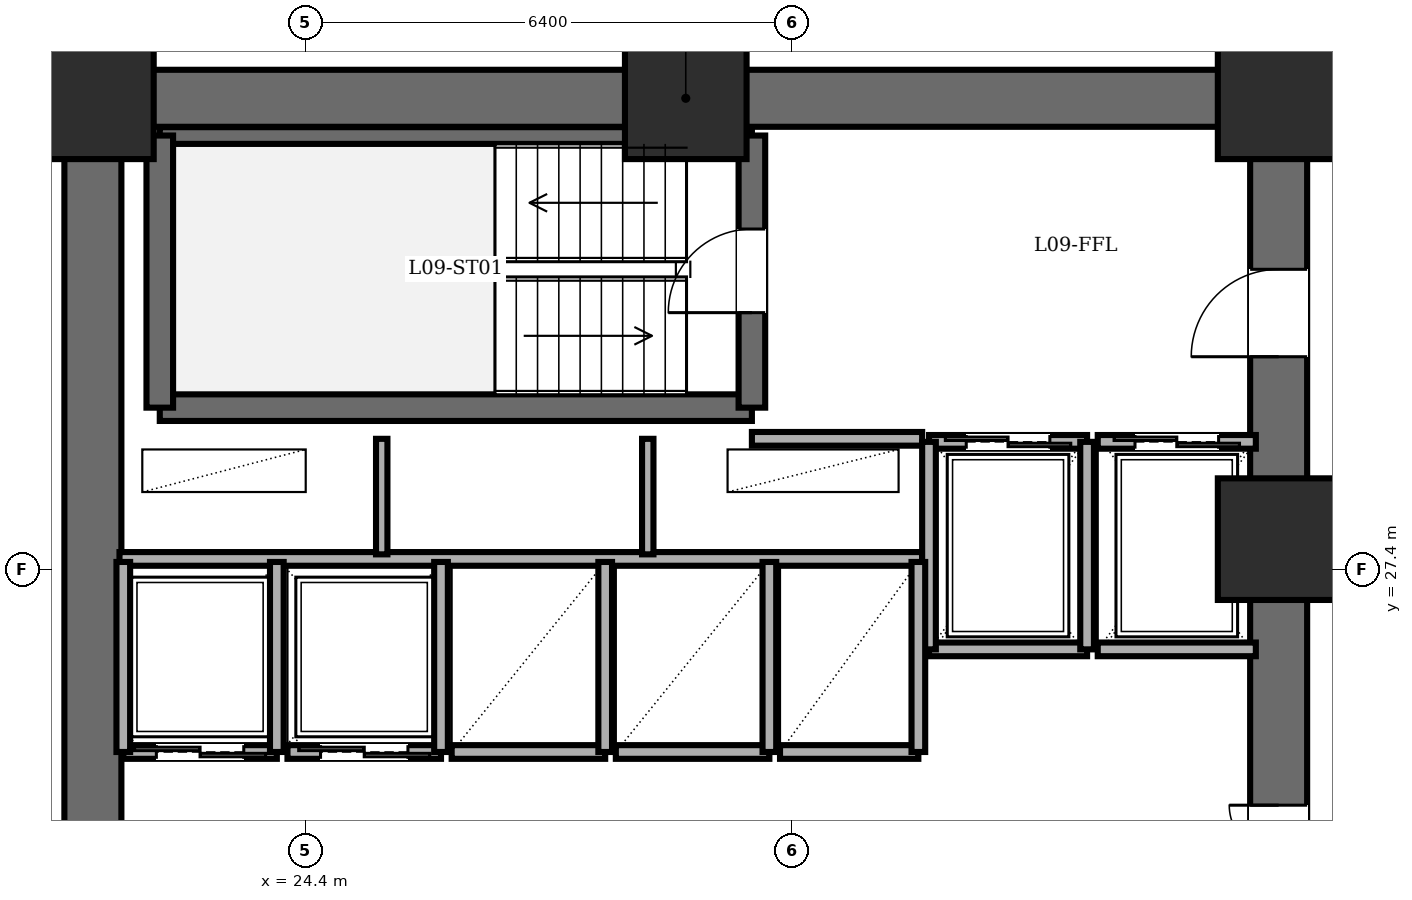
"""IFC4 building model, lengths in metres.
Left out: names, types, materials, properties, quantities, classifications, styles, units other than length and angle.
Written with IfcOpenShell. Run it as: python <this file> out.ifc"""

import sys

from ifc_helpers import new_model, si_unit, direction, frame, frame_2d, origin, origin_2d, place, context, subcontext, project, spatial, rectangle, extrude, element, fill, save


model = new_model("IFC4")
c1 = context("Model", 3, precision=1e-05, world=origin(), true_north=direction((0.0, 1.0)))
c2 = subcontext(c1, "Body", "Model", "MODEL_VIEW")
j1 = project(units=[si_unit("LENGTHUNIT", "METRE"), si_unit("PLANEANGLEUNIT", "RADIAN")], contexts=[c1])
p1 = place(None, origin())
s1 = spatial("IfcSite", under=j1, at=p1, CompositionType="ELEMENT")
p2 = place(p1, origin())
s2 = spatial("IfcBuilding", under=s1, at=p2, CompositionType="ELEMENT")
p3 = place(p2, frame((0.0, 0.0, 36.0)))
s3 = spatial("IfcBuildingStorey", under=s2, at=p3, CompositionType="ELEMENT", Elevation=36.0)
for number, where, z_axis, x_axis in (
    (1, (37.2, 27.8, 0.0), (0.0, 0.0, 1.0), (1.0, 0.0, 0.0)),
    (2, (37.2, 33.6, 0.0), (0.0, 0.0, 1.0), (1.0, 0.0, 0.0)),
    (3, (29.4, 33.6, 0.0), (0.0, 0.0, 1.0), (1.0, 0.0, 0.0)),
    (4, (21.6, 33.6, 0.0), (0.0, 0.0, 1.0), (1.0, 0.0, 0.0)),
):
    element("IfcColumn", number, at=place(p3, frame(where, z_axis=z_axis, x_axis=x_axis)), inside=s3, PredefinedType="COLUMN", context=c2, shape_type="SweptSolid", body=[
        extrude(rectangle(XDim=1.6, YDim=1.6, at=origin_2d()), origin(), (0.0, 0.0, 1.0), 3.6),
    ])
p4 = place(p3, frame((21.6, 14.4, 0.0), z_axis=(0.0, 0.0, 1.0), x_axis=(0.0, 1.0, 0.0)))
e5 = element("IfcWall", 5, at=p4, inside=s3, PredefinedType="SHEAR", context=c2, shape_type="SweptSolid", body=[
    extrude(rectangle(XDim=19.2, YDim=0.75, at=frame_2d((9.6, 0.0))), origin(), (0.0, 0.0, 1.0), 3.4),
])
p5 = place(p3, frame((21.6, 33.6, 0.0), z_axis=(0.0, 0.0, 1.0), x_axis=(1.0, 0.0, 0.0)))
e6 = element("IfcWall", 6, at=p5, inside=s3, PredefinedType="SHEAR", context=c2, shape_type="SweptSolid", body=[
    extrude(rectangle(XDim=15.6, YDim=0.75, at=frame_2d((7.8, 0.0))), origin(), (0.0, 0.0, 1.0), 3.4),
])
p6 = place(p3, frame((37.2, 14.4, 0.0), z_axis=(0.0, 0.0, 1.0), x_axis=(0.0, 1.0, 0.0)))
e7 = element("IfcWall", 7, at=p6, inside=s3, PredefinedType="SHEAR", context=c2, shape_type="SweptSolid", body=[
    extrude(rectangle(XDim=19.2, YDim=0.75, at=frame_2d((9.6, 0.0))), origin(), (0.0, 0.0, 1.0), 3.4),
])
p7 = place(p6, frame((15.8, 0.0, 0.0)))
e8 = element("IfcOpeningElement", 8, at=p7, cuts=e7, PredefinedType="OPENING", context=c2, shape_type="SweptSolid", body=[
    extrude(rectangle(XDim=1.15, YDim=2.15, at=frame_2d((0.575, 1.075))), frame((0.0, 0.385, 0.0), z_axis=(0.0, -1.0, 0.0), x_axis=(1.0, 0.0, 0.0)), (0.0, 0.0, 1.0), 0.77),
])
p8 = place(p6, frame((3.6, 0.0, 0.0)))
e9 = element("IfcOpeningElement", 9, at=p8, cuts=e7, PredefinedType="OPENING", context=c2, shape_type="SweptSolid", body=[
    extrude(rectangle(XDim=1.1, YDim=2.15, at=frame_2d((0.55, 1.075))), frame((0.0, 0.385, 0.0), z_axis=(0.0, -1.0, 0.0), x_axis=(1.0, 0.0, 0.0)), (0.0, 0.0, 1.0), 0.77),
])
p9 = place(p6, frame((8.6, 0.0, 0.0)))
e10 = element("IfcOpeningElement", 10, at=p9, cuts=e7, PredefinedType="OPENING", context=c2, shape_type="SweptSolid", body=[
    extrude(rectangle(XDim=1.3, YDim=2.2, at=frame_2d((0.65, 1.1))), frame((0.0, 0.385, 0.0), z_axis=(0.0, -1.0, 0.0), x_axis=(1.0, 0.0, 0.0)), (0.0, 0.0, 1.0), 0.77),
])
p10 = place(p3, frame((22.48, 29.53, 0.0), z_axis=(0.0, 0.0, 1.0), x_axis=(1.0, 0.0, 0.0)))
e11 = element("IfcWall", 11, at=p10, inside=s3, PredefinedType="SOLIDWALL", context=c2, shape_type="SweptSolid", body=[
    extrude(rectangle(XDim=7.79, YDim=0.35, at=frame_2d((3.895, 0.0))), origin(), (0.0, 0.0, 1.0), 3.4),
])
p11 = place(p3, frame((22.48, 33.11, 0.0), z_axis=(0.0, 0.0, 1.0), x_axis=(1.0, 0.0, 0.0)))
e12 = element("IfcWall", 12, at=p11, inside=s3, PredefinedType="PARTITIONING", context=c2, shape_type="SweptSolid", body=[
    extrude(rectangle(XDim=7.79, YDim=0.22, at=frame_2d((3.895, 0.0))), origin(), (0.0, 0.0, 1.0), 3.4),
])
p12 = place(p3, frame((22.48, 29.53, 0.0), z_axis=(0.0, 0.0, 1.0), x_axis=(0.0, 1.0, 0.0)))
e13 = element("IfcWall", 13, at=p12, inside=s3, PredefinedType="SOLIDWALL", context=c2, shape_type="SweptSolid", body=[
    extrude(rectangle(XDim=3.58, YDim=0.35, at=frame_2d((1.79, 0.0))), origin(), (0.0, 0.0, 1.0), 3.4),
])
p13 = place(p3, frame((30.27, 29.53, 0.0), z_axis=(0.0, 0.0, 1.0), x_axis=(0.0, 1.0, 0.0)))
e14 = element("IfcWall", 14, at=p13, inside=s3, PredefinedType="SOLIDWALL", context=c2, shape_type="SweptSolid", body=[
    extrude(rectangle(XDim=3.58, YDim=0.35, at=frame_2d((1.79, 0.0))), origin(), (0.0, 0.0, 1.0), 3.4),
])
p14 = place(p13, frame((1.25, 0.0, 0.0)))
e15 = element("IfcOpeningElement", 15, at=p14, cuts=e14, PredefinedType="OPENING", context=c2, shape_type="SweptSolid", body=[
    extrude(rectangle(XDim=1.1, YDim=2.15, at=frame_2d((0.55, 1.075))), frame((0.0, 0.185, 0.0), z_axis=(0.0, -1.0, 0.0), x_axis=(1.0, 0.0, 0.0)), (0.0, 0.0, 1.0), 0.37),
])
p15 = place(p3, frame((30.27, 29.12, 0.0), z_axis=(0.0, 0.0, 1.0), x_axis=(1.0, 0.0, 0.0)))
e16 = element("IfcWall", 16, at=p15, inside=s3, PredefinedType="PARTITIONING", context=c2, shape_type="SweptSolid", body=[
    extrude(rectangle(XDim=2.24, YDim=0.18, at=frame_2d((1.12, 0.0))), origin(), (0.0, 0.0, 1.0), 3.4),
])
p16 = place(p3, frame((21.95, 27.54, 0.0), z_axis=(0.0, 0.0, 1.0), x_axis=(1.0, 0.0, 0.0)))
e17 = element("IfcWall", 17, at=p16, inside=s3, PredefinedType="PARTITIONING", context=c2, shape_type="SweptSolid", body=[
    extrude(rectangle(XDim=10.56, YDim=0.18, at=frame_2d((5.28, 0.0))), origin(), (0.0, 0.0, 1.0), 3.4),
])
for number, where, z_axis, x_axis in (
    (18, (25.4, 27.6, 0.0), (0.0, 0.0, 1.0), (0.0, 1.0, 0.0)),
    (19, (28.9, 27.6, 0.0), (0.0, 0.0, 1.0), (0.0, 1.0, 0.0)),
):
    element("IfcWall", number, at=place(p3, frame(where, z_axis=z_axis, x_axis=x_axis)), inside=s3, PredefinedType="PARTITIONING", context=c2, shape_type="SweptSolid", body=[
        extrude(rectangle(XDim=1.52, YDim=0.15, at=frame_2d((0.76, 0.0))), origin(), (0.0, 0.0, 1.0), 3.4),
    ])
p17 = place(p3, frame((32.6, 29.08, 0.0), z_axis=(0.0, 0.0, 1.0), x_axis=(1.0, 0.0, 0.0)))
e20 = element("IfcWall", 20, at=p17, inside=s3, PredefinedType="PARTITIONING", context=c2, shape_type="SweptSolid", body=[
    extrude(rectangle(XDim=2.08, YDim=0.18, at=frame_2d((1.04, 0.0))), origin(), (0.0, 0.0, 1.0), 3.4),
])
p18 = place(p17, frame((0.49, 0.0, 0.0)))
e21 = element("IfcOpeningElement", 21, at=p18, cuts=e20, PredefinedType="OPENING", context=c2, shape_type="SweptSolid", body=[
    extrude(rectangle(XDim=1.1, YDim=2.2, at=frame_2d((0.55, 1.1))), frame((0.0, 0.1, 0.0), z_axis=(0.0, -1.0, 0.0), x_axis=(1.0, 0.0, 0.0)), (0.0, 0.0, 1.0), 0.2),
])
p19 = place(p3, frame((34.68, 26.35, 0.0), z_axis=(0.0, 0.0, 1.0), x_axis=(-1.0, 0.0, 0.0)))
e22 = element("IfcWall", 22, at=p19, inside=s3, PredefinedType="PARTITIONING", context=c2, shape_type="SweptSolid", body=[
    extrude(rectangle(XDim=2.08, YDim=0.18, at=frame_2d((1.04, 0.0))), origin(), (0.0, 0.0, 1.0), 3.4),
])
for number, where, z_axis, x_axis in (
    (23, (34.68, 26.35, 0.0), (0.0, 0.0, 1.0), (0.0, 1.0, 0.0)),
    (24, (32.6, 29.08, 0.0), (0.0, 0.0, 1.0), (0.0, -1.0, 0.0)),
):
    element("IfcWall", number, at=place(p3, frame(where, z_axis=z_axis, x_axis=x_axis)), inside=s3, PredefinedType="PARTITIONING", context=c2, shape_type="SweptSolid", body=[
        extrude(rectangle(XDim=2.73, YDim=0.18, at=frame_2d((1.365, 0.0))), origin(), (0.0, 0.0, 1.0), 3.4),
    ])
p20 = place(p3, frame((34.82, 29.08, 0.0), z_axis=(0.0, 0.0, 1.0), x_axis=(1.0, 0.0, 0.0)))
e25 = element("IfcWall", 25, at=p20, inside=s3, PredefinedType="PARTITIONING", context=c2, shape_type="SweptSolid", body=[
    extrude(rectangle(XDim=2.08, YDim=0.18, at=frame_2d((1.04, 0.0))), origin(), (0.0, 0.0, 1.0), 3.4),
])
p21 = place(p20, frame((0.49, 0.0, 0.0)))
e26 = element("IfcOpeningElement", 26, at=p21, cuts=e25, PredefinedType="OPENING", context=c2, shape_type="SweptSolid", body=[
    extrude(rectangle(XDim=1.1, YDim=2.2, at=frame_2d((0.55, 1.1))), frame((0.0, 0.1, 0.0), z_axis=(0.0, -1.0, 0.0), x_axis=(1.0, 0.0, 0.0)), (0.0, 0.0, 1.0), 0.2),
])
p22 = place(p3, frame((36.9, 26.35, 0.0), z_axis=(0.0, 0.0, 1.0), x_axis=(-1.0, 0.0, 0.0)))
e27 = element("IfcWall", 27, at=p22, inside=s3, PredefinedType="PARTITIONING", context=c2, shape_type="SweptSolid", body=[
    extrude(rectangle(XDim=2.08, YDim=0.18, at=frame_2d((1.04, 0.0))), origin(), (0.0, 0.0, 1.0), 3.4),
])
p23 = place(p3, frame((24.02, 25.0, 0.0), z_axis=(0.0, 0.0, 1.0), x_axis=(-1.0, 0.0, 0.0)))
e28 = element("IfcWall", 28, at=p23, inside=s3, PredefinedType="PARTITIONING", context=c2, shape_type="SweptSolid", body=[
    extrude(rectangle(XDim=2.02, YDim=0.18, at=frame_2d((1.01, 0.0))), origin(), (0.0, 0.0, 1.0), 3.4),
])
p24 = place(p23, frame((0.435, 0.0, 0.0)))
e29 = element("IfcOpeningElement", 29, at=p24, cuts=e28, PredefinedType="OPENING", context=c2, shape_type="SweptSolid", body=[
    extrude(rectangle(XDim=1.15, YDim=2.2, at=frame_2d((0.575, 1.1))), frame((0.0, 0.1, 0.0), z_axis=(0.0, -1.0, 0.0), x_axis=(1.0, 0.0, 0.0)), (0.0, 0.0, 1.0), 0.2),
])
for number, where, z_axis, x_axis in (
    (30, (24.02, 25.0, 0.0), (0.0, 0.0, 1.0), (0.0, 1.0, 0.0)),
    (31, (22.0, 27.5, 0.0), (0.0, 0.0, 1.0), (0.0, -1.0, 0.0)),
):
    element("IfcWall", number, at=place(p3, frame(where, z_axis=z_axis, x_axis=x_axis)), inside=s3, PredefinedType="PARTITIONING", context=c2, shape_type="SweptSolid", body=[
        extrude(rectangle(XDim=2.5, YDim=0.18, at=frame_2d((1.25, 0.0))), origin(), (0.0, 0.0, 1.0), 3.4),
    ])
p25 = place(p3, frame((26.18, 25.0, 0.0), z_axis=(0.0, 0.0, 1.0), x_axis=(-1.0, 0.0, 0.0)))
e32 = element("IfcWall", 32, at=p25, inside=s3, PredefinedType="PARTITIONING", context=c2, shape_type="SweptSolid", body=[
    extrude(rectangle(XDim=2.02, YDim=0.18, at=frame_2d((1.01, 0.0))), origin(), (0.0, 0.0, 1.0), 3.4),
])
p26 = place(p25, frame((0.435, 0.0, 0.0)))
e33 = element("IfcOpeningElement", 33, at=p26, cuts=e32, PredefinedType="OPENING", context=c2, shape_type="SweptSolid", body=[
    extrude(rectangle(XDim=1.15, YDim=2.2, at=frame_2d((0.575, 1.1))), frame((0.0, 0.1, 0.0), z_axis=(0.0, -1.0, 0.0), x_axis=(1.0, 0.0, 0.0)), (0.0, 0.0, 1.0), 0.2),
])
p27 = place(p3, frame((26.18, 25.0, 0.0), z_axis=(0.0, 0.0, 1.0), x_axis=(0.0, 1.0, 0.0)))
e34 = element("IfcWall", 34, at=p27, inside=s3, PredefinedType="PARTITIONING", context=c2, shape_type="SweptSolid", body=[
    extrude(rectangle(XDim=2.5, YDim=0.18, at=frame_2d((1.25, 0.0))), origin(), (0.0, 0.0, 1.0), 3.4),
])
p28 = place(p3, frame((28.34, 25.0, 0.0), z_axis=(0.0, 0.0, 1.0), x_axis=(-1.0, 0.0, 0.0)))
e35 = element("IfcWall", 35, at=p28, inside=s3, PredefinedType="PARTITIONING", context=c2, shape_type="SweptSolid", body=[
    extrude(rectangle(XDim=2.02, YDim=0.18, at=frame_2d((1.01, 0.0))), origin(), (0.0, 0.0, 1.0), 3.4),
])
p29 = place(p3, frame((28.34, 25.0, 0.0), z_axis=(0.0, 0.0, 1.0), x_axis=(0.0, 1.0, 0.0)))
e36 = element("IfcWall", 36, at=p29, inside=s3, PredefinedType="PARTITIONING", context=c2, shape_type="SweptSolid", body=[
    extrude(rectangle(XDim=2.5, YDim=0.18, at=frame_2d((1.25, 0.0))), origin(), (0.0, 0.0, 1.0), 3.4),
])
p30 = place(p3, frame((30.5, 25.0, 0.0), z_axis=(0.0, 0.0, 1.0), x_axis=(-1.0, 0.0, 0.0)))
e37 = element("IfcWall", 37, at=p30, inside=s3, PredefinedType="PARTITIONING", context=c2, shape_type="SweptSolid", body=[
    extrude(rectangle(XDim=2.02, YDim=0.18, at=frame_2d((1.01, 0.0))), origin(), (0.0, 0.0, 1.0), 3.4),
])
p31 = place(p3, frame((30.5, 25.0, 0.0), z_axis=(0.0, 0.0, 1.0), x_axis=(0.0, 1.0, 0.0)))
e38 = element("IfcWall", 38, at=p31, inside=s3, PredefinedType="PARTITIONING", context=c2, shape_type="SweptSolid", body=[
    extrude(rectangle(XDim=2.5, YDim=0.18, at=frame_2d((1.25, 0.0))), origin(), (0.0, 0.0, 1.0), 3.4),
])
p32 = place(p3, frame((32.46, 25.0, 0.0), z_axis=(0.0, 0.0, 1.0), x_axis=(-1.0, 0.0, 0.0)))
e39 = element("IfcWall", 39, at=p32, inside=s3, PredefinedType="PARTITIONING", context=c2, shape_type="SweptSolid", body=[
    extrude(rectangle(XDim=1.82, YDim=0.18, at=frame_2d((0.91, 0.0))), origin(), (0.0, 0.0, 1.0), 3.4),
])
p33 = place(p3, frame((32.46, 25.0, 0.0), z_axis=(0.0, 0.0, 1.0), x_axis=(0.0, 1.0, 0.0)))
e40 = element("IfcWall", 40, at=p33, inside=s3, PredefinedType="PARTITIONING", context=c2, shape_type="SweptSolid", body=[
    extrude(rectangle(XDim=2.5, YDim=0.18, at=frame_2d((1.25, 0.0))), origin(), (0.0, 0.0, 1.0), 3.4),
])
p34 = place(p14, origin())
e41 = element("IfcDoor", 41, at=p34, inside=s3, OperationType="SINGLE_SWING_LEFT", PredefinedType="DOOR", context=c2, shape_type="SweptSolid", body=[
    extrude(rectangle(XDim=1.1, YDim=2.15, at=frame_2d((0.55, 1.075))), frame((0.0, 0.025, 0.0), z_axis=(0.0, -1.0, 0.0), x_axis=(1.0, 0.0, 0.0)), (0.0, 0.0, 1.0), 0.05),
])
fill(e15, e41)
p35 = place(p7, origin())
e42 = element("IfcDoor", 42, at=p35, inside=s3, OperationType="SINGLE_SWING_LEFT", PredefinedType="DOOR", context=c2, shape_type="SweptSolid", body=[
    extrude(rectangle(XDim=1.15, YDim=2.15, at=frame_2d((0.575, 1.075))), frame((0.0, 0.025, 0.0), z_axis=(0.0, -1.0, 0.0), x_axis=(1.0, 0.0, 0.0)), (0.0, 0.0, 1.0), 0.05),
])
fill(e8, e42)
p36 = place(p18, origin())
e43 = element("IfcDoor", 43, at=p36, inside=s3, OperationType="DOUBLE_DOOR_SLIDING", PredefinedType="DOOR", context=c2, shape_type="SweptSolid", body=[
    extrude(rectangle(XDim=1.1, YDim=2.2, at=frame_2d((0.55, 1.1))), frame((0.0, 0.025, 0.0), z_axis=(0.0, -1.0, 0.0), x_axis=(1.0, 0.0, 0.0)), (0.0, 0.0, 1.0), 0.05),
])
fill(e21, e43)
p37 = place(p21, origin())
e44 = element("IfcDoor", 44, at=p37, inside=s3, OperationType="DOUBLE_DOOR_SLIDING", PredefinedType="DOOR", context=c2, shape_type="SweptSolid", body=[
    extrude(rectangle(XDim=1.1, YDim=2.2, at=frame_2d((0.55, 1.1))), frame((0.0, 0.025, 0.0), z_axis=(0.0, -1.0, 0.0), x_axis=(1.0, 0.0, 0.0)), (0.0, 0.0, 1.0), 0.05),
])
fill(e26, e44)
p38 = place(p24, origin())
e45 = element("IfcDoor", 45, at=p38, inside=s3, OperationType="DOUBLE_DOOR_SLIDING", PredefinedType="DOOR", context=c2, shape_type="SweptSolid", body=[
    extrude(rectangle(XDim=1.15, YDim=2.2, at=frame_2d((0.575, 1.1))), frame((0.0, 0.025, 0.0), z_axis=(0.0, -1.0, 0.0), x_axis=(1.0, 0.0, 0.0)), (0.0, 0.0, 1.0), 0.05),
])
fill(e29, e45)
p39 = place(p26, origin())
e46 = element("IfcDoor", 46, at=p39, inside=s3, OperationType="DOUBLE_DOOR_SLIDING", PredefinedType="DOOR", context=c2, shape_type="SweptSolid", body=[
    extrude(rectangle(XDim=1.15, YDim=2.2, at=frame_2d((0.575, 1.1))), frame((0.0, 0.025, 0.0), z_axis=(0.0, -1.0, 0.0), x_axis=(1.0, 0.0, 0.0)), (0.0, 0.0, 1.0), 0.05),
])
fill(e33, e46)
p40 = place(p9, origin())
e47 = element("IfcDoor", 47, at=p40, inside=s3, OperationType="DOUBLE_DOOR_SINGLE_SWING", PredefinedType="DOOR", context=c2, shape_type="SweptSolid", body=[
    extrude(rectangle(XDim=1.3, YDim=2.2, at=frame_2d((0.65, 1.1))), frame((0.0, 0.025, 0.0), z_axis=(0.0, -1.0, 0.0), x_axis=(1.0, 0.0, 0.0)), (0.0, 0.0, 1.0), 0.05),
])
fill(e10, e47)
save(model, sys.argv[1])
